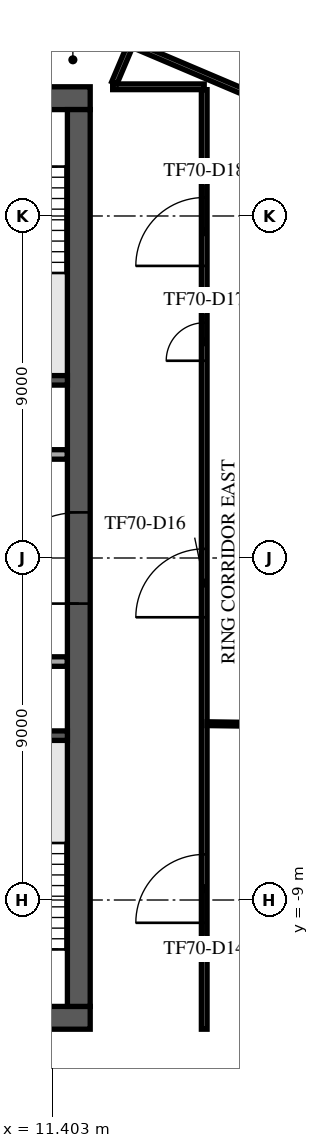
"""IFC4 building model, lengths in metres.
Left out: names, types, materials, properties, quantities, classifications, styles, units other than length and angle.
Written with IfcOpenShell. Run it as: python <this file> out.ifc"""

import sys

from ifc_helpers import new_model, si_unit, direction, frame, frame_2d, origin, place, context, subcontext, project, spatial, rectangle, extrude, element, fill, save


model = new_model("IFC4")
c1 = context("Model", 3, precision=1e-05, world=origin(), true_north=direction((0.0, 1.0)))
c2 = subcontext(c1, "Body", "Model", "MODEL_VIEW")
j1 = project(units=[si_unit("LENGTHUNIT", "METRE"), si_unit("PLANEANGLEUNIT", "RADIAN")], contexts=[c1])
p1 = place(None, origin())
s1 = spatial("IfcSite", under=j1, at=p1, CompositionType="ELEMENT")
p2 = place(p1, origin())
s2 = spatial("IfcBuilding", under=s1, at=p2, CompositionType="ELEMENT")
p3 = place(p2, frame((0.0, 0.0, 296.5)))
s3 = spatial("IfcBuildingStorey", under=s2, at=p3, CompositionType="ELEMENT", Elevation=296.5)
p4 = place(p3, frame((-12.4, 12.1, 0.0), z_axis=(0.0, 0.0, 1.0), x_axis=(1.0, 0.0, 0.0)))
e1 = element("IfcWall", 1, at=p4, inside=s3, PredefinedType="SHEAR", context=c2, shape_type="SweptSolid", body=[
    extrude(rectangle(XDim=24.8, YDim=0.6, at=frame_2d((12.4, 0.0))), origin(), (0.0, 0.0, 1.0), 3.65),
])
p5 = place(p4, frame((11.2, 0.0, 0.0)))
e2 = element("IfcOpeningElement", 2, at=p5, cuts=e1, PredefinedType="OPENING", context=c2, shape_type="SweptSolid", body=[
    extrude(rectangle(XDim=2.4, YDim=2.4, at=frame_2d((1.2, 1.2))), frame((0.0, 0.31, 0.0), z_axis=(0.0, -1.0, 0.0), x_axis=(1.0, 0.0, 0.0)), (0.0, 0.0, 1.0), 0.62),
])
p6 = place(p4, frame((22.025, 0.0, 0.0)))
e3 = element("IfcOpeningElement", 3, at=p6, cuts=e1, PredefinedType="OPENING", context=c2, shape_type="SweptSolid", body=[
    extrude(rectangle(XDim=1.2, YDim=2.1, at=frame_2d((0.6, 1.05))), frame((0.0, 0.31, 0.0), z_axis=(0.0, -1.0, 0.0), x_axis=(1.0, 0.0, 0.0)), (0.0, 0.0, 1.0), 0.62),
])
p7 = place(p4, frame((1.0, 0.0, 0.0)))
e4 = element("IfcOpeningElement", 4, at=p7, cuts=e1, PredefinedType="OPENING", context=c2, shape_type="SweptSolid", body=[
    extrude(rectangle(XDim=1.0, YDim=2.1, at=frame_2d((0.5, 1.05))), frame((0.0, 0.31, 0.0), z_axis=(0.0, -1.0, 0.0), x_axis=(1.0, 0.0, 0.0)), (0.0, 0.0, 1.0), 0.62),
])
p8 = place(p3, frame((-12.4, -12.1, 0.0), z_axis=(0.0, 0.0, 1.0), x_axis=(1.0, 0.0, 0.0)))
e5 = element("IfcWall", 5, at=p8, inside=s3, PredefinedType="SHEAR", context=c2, shape_type="SweptSolid", body=[
    extrude(rectangle(XDim=24.8, YDim=0.6, at=frame_2d((12.4, 0.0))), origin(), (0.0, 0.0, 1.0), 3.65),
])
p9 = place(p8, frame((7.3, 0.0, 0.0)))
e6 = element("IfcOpeningElement", 6, at=p9, cuts=e5, PredefinedType="OPENING", context=c2, shape_type="SweptSolid", body=[
    extrude(rectangle(XDim=2.0, YDim=2.1, at=frame_2d((1.0, 1.05))), frame((0.0, 0.31, 0.0), z_axis=(0.0, -1.0, 0.0), x_axis=(1.0, 0.0, 0.0)), (0.0, 0.0, 1.0), 0.62),
])
p10 = place(p8, frame((17.425, 0.0, 0.0)))
e7 = element("IfcOpeningElement", 7, at=p10, cuts=e5, PredefinedType="OPENING", context=c2, shape_type="SweptSolid", body=[
    extrude(rectangle(XDim=1.2, YDim=2.1, at=frame_2d((0.6, 1.05))), frame((0.0, 0.31, 0.0), z_axis=(0.0, -1.0, 0.0), x_axis=(1.0, 0.0, 0.0)), (0.0, 0.0, 1.0), 0.62),
])
p11 = place(p8, frame((1.575, 0.0, 0.0)))
e8 = element("IfcOpeningElement", 8, at=p11, cuts=e5, PredefinedType="OPENING", context=c2, shape_type="SweptSolid", body=[
    extrude(rectangle(XDim=1.2, YDim=2.1, at=frame_2d((0.6, 1.05))), frame((0.0, 0.31, 0.0), z_axis=(0.0, -1.0, 0.0), x_axis=(1.0, 0.0, 0.0)), (0.0, 0.0, 1.0), 0.62),
])
p12 = place(p8, frame((22.025, 0.0, 0.0)))
e9 = element("IfcOpeningElement", 9, at=p12, cuts=e5, PredefinedType="OPENING", context=c2, shape_type="SweptSolid", body=[
    extrude(rectangle(XDim=1.2, YDim=2.1, at=frame_2d((0.6, 1.05))), frame((0.0, 0.31, 0.0), z_axis=(0.0, -1.0, 0.0), x_axis=(1.0, 0.0, 0.0)), (0.0, 0.0, 1.0), 0.62),
])
p13 = place(p3, frame((12.1, -11.8, 0.0), z_axis=(0.0, 0.0, 1.0), x_axis=(0.0, 1.0, 0.0)))
e10 = element("IfcWall", 10, at=p13, inside=s3, PredefinedType="SHEAR", context=c2, shape_type="SweptSolid", body=[
    extrude(rectangle(XDim=23.6, YDim=0.6, at=frame_2d((11.8, 0.0))), origin(), (0.0, 0.0, 1.0), 3.65),
])
p14 = place(p13, frame((10.6, 0.0, 0.0)))
e11 = element("IfcOpeningElement", 11, at=p14, cuts=e10, PredefinedType="OPENING", context=c2, shape_type="SweptSolid", body=[
    extrude(rectangle(XDim=2.4, YDim=2.4, at=frame_2d((1.2, 1.2))), frame((0.0, 0.31, 0.0), z_axis=(0.0, -1.0, 0.0), x_axis=(1.0, 0.0, 0.0)), (0.0, 0.0, 1.0), 0.62),
])
for number, where, z_axis, x_axis in (
    (12, (8.65, 4.675, 0.0), (0.0, 0.0, 1.0), (1.0, 0.0, 0.0)),
    (13, (8.65, -4.675, 0.0), (0.0, 0.0, 1.0), (1.0, 0.0, 0.0)),
):
    element("IfcWall", number, at=place(p3, frame(where, z_axis=z_axis, x_axis=x_axis)), inside=s3, PredefinedType="SOLIDWALL", context=c2, shape_type="SweptSolid", body=[
        extrude(rectangle(XDim=3.15, YDim=0.25, at=frame_2d((1.575, 0.0))), origin(), (0.0, 0.0, 1.0), 3.65),
    ])
p15 = place(p3, frame((5.63, -2.725, 0.0), z_axis=(0.0, 0.0, 1.0), x_axis=(1.0, 0.0, 0.0)))
e14 = element("IfcWall", 14, at=p15, inside=s3, PredefinedType="PARTITIONING", context=c2, shape_type="SweptSolid", body=[
    extrude(rectangle(XDim=6.165, YDim=0.25, at=frame_2d((3.083, 0.0))), origin(), (0.0, 0.0, 1.0), 3.65),
])
p16 = place(p15, frame((0.745, 0.0, 0.0)))
e15 = element("IfcOpeningElement", 15, at=p16, cuts=e14, PredefinedType="OPENING", context=c2, shape_type="SweptSolid", body=[
    extrude(rectangle(XDim=1.0, YDim=2.1, at=frame_2d((0.5, 1.05))), frame((0.0, 0.135, 0.0), z_axis=(0.0, -1.0, 0.0), x_axis=(1.0, 0.0, 0.0)), (0.0, 0.0, 1.0), 0.27),
])
p17 = place(p15, frame((3.92, 0.0, 0.0)))
e16 = element("IfcOpeningElement", 16, at=p17, cuts=e14, PredefinedType="OPENING", context=c2, shape_type="SweptSolid", body=[
    extrude(rectangle(XDim=0.9, YDim=2.1, at=frame_2d((0.45, 1.05))), frame((0.0, 0.135, 0.0), z_axis=(0.0, -1.0, 0.0), x_axis=(1.0, 0.0, 0.0)), (0.0, 0.0, 1.0), 0.27),
])
p18 = place(p3, frame((-11.795, 2.725, 0.0), z_axis=(0.0, 0.0, 1.0), x_axis=(1.0, 0.0, 0.0)))
e17 = element("IfcWall", 17, at=p18, inside=s3, PredefinedType="PARTITIONING", context=c2, shape_type="SweptSolid", body=[
    extrude(rectangle(XDim=23.59, YDim=0.25, at=frame_2d((11.795, 0.0))), origin(), (0.0, 0.0, 1.0), 3.65),
])
p19 = place(p18, frame((21.345, 0.0, 0.0)))
e18 = element("IfcOpeningElement", 18, at=p19, cuts=e17, PredefinedType="OPENING", context=c2, shape_type="SweptSolid", body=[
    extrude(rectangle(XDim=0.9, YDim=2.1, at=frame_2d((0.45, 1.05))), frame((0.0, 0.135, 0.0), z_axis=(0.0, -1.0, 0.0), x_axis=(1.0, 0.0, 0.0)), (0.0, 0.0, 1.0), 0.27),
])
p20 = place(p18, frame((1.345, 0.0, 0.0)))
e19 = element("IfcOpeningElement", 19, at=p20, cuts=e17, PredefinedType="OPENING", context=c2, shape_type="SweptSolid", body=[
    extrude(rectangle(XDim=0.9, YDim=2.1, at=frame_2d((0.45, 1.05))), frame((0.0, 0.135, 0.0), z_axis=(0.0, -1.0, 0.0), x_axis=(1.0, 0.0, 0.0)), (0.0, 0.0, 1.0), 0.27),
])
p21 = place(p18, frame((4.42, 0.0, 0.0)))
e20 = element("IfcOpeningElement", 20, at=p21, cuts=e17, PredefinedType="OPENING", context=c2, shape_type="SweptSolid", body=[
    extrude(rectangle(XDim=1.0, YDim=2.1, at=frame_2d((0.5, 1.05))), frame((0.0, 0.135, 0.0), z_axis=(0.0, -1.0, 0.0), x_axis=(1.0, 0.0, 0.0)), (0.0, 0.0, 1.0), 0.27),
])
p22 = place(p18, frame((9.82, 0.0, 0.0)))
e21 = element("IfcOpeningElement", 21, at=p22, cuts=e17, PredefinedType="OPENING", context=c2, shape_type="SweptSolid", body=[
    extrude(rectangle(XDim=1.2, YDim=2.1, at=frame_2d((0.6, 1.05))), frame((0.0, 0.135, 0.0), z_axis=(0.0, -1.0, 0.0), x_axis=(1.0, 0.0, 0.0)), (0.0, 0.0, 1.0), 0.27),
])
p23 = place(p3, frame((15.204, -32.515, 0.0), z_axis=(0.0, 0.0, 1.0), x_axis=(0.390728997462, 0.920505758017, 0.0)))
e22 = element("IfcWall", 22, at=p23, inside=s3, PredefinedType="STANDARD", context=c2, shape_type="SweptSolid", body=[
    extrude(rectangle(XDim=47.979, YDim=0.6, at=frame_2d((23.99, 0.0))), origin(), (0.0, 0.0, 1.0), 3.65),
])
p24 = place(p23, frame((1.231, 0.0, 0.9)))
e23 = element("IfcOpeningElement", 23, at=p24, cuts=e22, PredefinedType="OPENING", context=c2, shape_type="SweptSolid", body=[
    extrude(rectangle(XDim=1.9, YDim=2.1, at=frame_2d((0.95, 1.05))), frame((0.0, 0.31, 0.0), z_axis=(0.0, -1.0, 0.0), x_axis=(1.0, 0.0, 0.0)), (0.0, 0.0, 1.0), 0.62),
])
p25 = place(p23, frame((5.593, 0.0, 0.9)))
e24 = element("IfcOpeningElement", 24, at=p25, cuts=e22, PredefinedType="OPENING", context=c2, shape_type="SweptSolid", body=[
    extrude(rectangle(XDim=1.9, YDim=2.1, at=frame_2d((0.95, 1.05))), frame((0.0, 0.31, 0.0), z_axis=(0.0, -1.0, 0.0), x_axis=(1.0, 0.0, 0.0)), (0.0, 0.0, 1.0), 0.62),
])
p26 = place(p23, frame((9.954, 0.0, 0.9)))
e25 = element("IfcOpeningElement", 25, at=p26, cuts=e22, PredefinedType="OPENING", context=c2, shape_type="SweptSolid", body=[
    extrude(rectangle(XDim=1.9, YDim=2.1, at=frame_2d((0.95, 1.05))), frame((0.0, 0.31, 0.0), z_axis=(0.0, -1.0, 0.0), x_axis=(1.0, 0.0, 0.0)), (0.0, 0.0, 1.0), 0.62),
])
p27 = place(p23, frame((14.316, 0.0, 0.9)))
e26 = element("IfcOpeningElement", 26, at=p27, cuts=e22, PredefinedType="OPENING", context=c2, shape_type="SweptSolid", body=[
    extrude(rectangle(XDim=1.9, YDim=2.1, at=frame_2d((0.95, 1.05))), frame((0.0, 0.31, 0.0), z_axis=(0.0, -1.0, 0.0), x_axis=(1.0, 0.0, 0.0)), (0.0, 0.0, 1.0), 0.62),
])
p28 = place(p23, frame((18.678, 0.0, 0.9)))
e27 = element("IfcOpeningElement", 27, at=p28, cuts=e22, PredefinedType="OPENING", context=c2, shape_type="SweptSolid", body=[
    extrude(rectangle(XDim=1.9, YDim=2.1, at=frame_2d((0.95, 1.05))), frame((0.0, 0.31, 0.0), z_axis=(0.0, -1.0, 0.0), x_axis=(1.0, 0.0, 0.0)), (0.0, 0.0, 1.0), 0.62),
])
p29 = place(p23, frame((23.04, 0.0, 0.9)))
e28 = element("IfcOpeningElement", 28, at=p29, cuts=e22, PredefinedType="OPENING", context=c2, shape_type="SweptSolid", body=[
    extrude(rectangle(XDim=1.9, YDim=2.1, at=frame_2d((0.95, 1.05))), frame((0.0, 0.31, 0.0), z_axis=(0.0, -1.0, 0.0), x_axis=(1.0, 0.0, 0.0)), (0.0, 0.0, 1.0), 0.62),
])
p30 = place(p23, frame((27.401, 0.0, 0.9)))
e29 = element("IfcOpeningElement", 29, at=p30, cuts=e22, PredefinedType="OPENING", context=c2, shape_type="SweptSolid", body=[
    extrude(rectangle(XDim=1.9, YDim=2.1, at=frame_2d((0.95, 1.05))), frame((0.0, 0.31, 0.0), z_axis=(0.0, -1.0, 0.0), x_axis=(1.0, 0.0, 0.0)), (0.0, 0.0, 1.0), 0.62),
])
p31 = place(p23, frame((31.763, 0.0, 0.9)))
e30 = element("IfcOpeningElement", 30, at=p31, cuts=e22, PredefinedType="OPENING", context=c2, shape_type="SweptSolid", body=[
    extrude(rectangle(XDim=1.9, YDim=2.1, at=frame_2d((0.95, 1.05))), frame((0.0, 0.31, 0.0), z_axis=(0.0, -1.0, 0.0), x_axis=(1.0, 0.0, 0.0)), (0.0, 0.0, 1.0), 0.62),
])
p32 = place(p23, frame((36.125, 0.0, 0.9)))
e31 = element("IfcOpeningElement", 31, at=p32, cuts=e22, PredefinedType="OPENING", context=c2, shape_type="SweptSolid", body=[
    extrude(rectangle(XDim=1.9, YDim=2.1, at=frame_2d((0.95, 1.05))), frame((0.0, 0.31, 0.0), z_axis=(0.0, -1.0, 0.0), x_axis=(1.0, 0.0, 0.0)), (0.0, 0.0, 1.0), 0.62),
])
p33 = place(p23, frame((40.487, 0.0, 0.9)))
e32 = element("IfcOpeningElement", 32, at=p33, cuts=e22, PredefinedType="OPENING", context=c2, shape_type="SweptSolid", body=[
    extrude(rectangle(XDim=1.9, YDim=2.1, at=frame_2d((0.95, 1.05))), frame((0.0, 0.31, 0.0), z_axis=(0.0, -1.0, 0.0), x_axis=(1.0, 0.0, 0.0)), (0.0, 0.0, 1.0), 0.62),
])
p34 = place(p23, frame((44.848, 0.0, 0.9)))
e33 = element("IfcOpeningElement", 33, at=p34, cuts=e22, PredefinedType="OPENING", context=c2, shape_type="SweptSolid", body=[
    extrude(rectangle(XDim=1.9, YDim=2.1, at=frame_2d((0.95, 1.05))), frame((0.0, 0.31, 0.0), z_axis=(0.0, -1.0, 0.0), x_axis=(1.0, 0.0, 0.0)), (0.0, 0.0, 1.0), 0.62),
])
p35 = place(p3, frame((-8.176, 25.325, 0.0), z_axis=(0.0, 0.0, 1.0), x_axis=(0.920507643781, -0.390724554821, 0.0)))
e34 = element("IfcWall", 34, at=p35, inside=s3, PredefinedType="PARTITIONING", context=c2, shape_type="SweptSolid", body=[
    extrude(rectangle(XDim=34.917, YDim=0.15, at=frame_2d((17.458, 0.0))), origin(), (0.0, 0.0, 1.0), 3.25),
])
p36 = place(p35, frame((5.55, 0.0, 0.0)))
e35 = element("IfcOpeningElement", 35, at=p36, cuts=e34, PredefinedType="OPENING", context=c2, shape_type="SweptSolid", body=[
    extrude(rectangle(XDim=1.8, YDim=2.1, at=frame_2d((0.9, 1.05))), frame((0.0, 0.085, 0.0), z_axis=(0.0, -1.0, 0.0), x_axis=(1.0, 0.0, 0.0)), (0.0, 0.0, 1.0), 0.17),
])
p37 = place(p35, frame((1.05, 0.0, 0.0)))
e36 = element("IfcOpeningElement", 36, at=p37, cuts=e34, PredefinedType="OPENING", context=c2, shape_type="SweptSolid", body=[
    extrude(rectangle(XDim=1.0, YDim=2.1, at=frame_2d((0.5, 1.05))), frame((0.0, 0.085, 0.0), z_axis=(0.0, -1.0, 0.0), x_axis=(1.0, 0.0, 0.0)), (0.0, 0.0, 1.0), 0.17),
])
p38 = place(p35, frame((16.098, 0.0, 0.0)))
e37 = element("IfcOpeningElement", 37, at=p38, cuts=e34, PredefinedType="OPENING", context=c2, shape_type="SweptSolid", body=[
    extrude(rectangle(XDim=1.0, YDim=2.1, at=frame_2d((0.5, 1.05))), frame((0.0, 0.085, 0.0), z_axis=(0.0, -1.0, 0.0), x_axis=(1.0, 0.0, 0.0)), (0.0, 0.0, 1.0), 0.17),
])
p39 = place(p35, frame((23.547, 0.0, 0.0)))
e38 = element("IfcOpeningElement", 38, at=p39, cuts=e34, PredefinedType="OPENING", context=c2, shape_type="SweptSolid", body=[
    extrude(rectangle(XDim=1.0, YDim=2.1, at=frame_2d((0.5, 1.05))), frame((0.0, 0.085, 0.0), z_axis=(0.0, -1.0, 0.0), x_axis=(1.0, 0.0, 0.0)), (0.0, 0.0, 1.0), 0.17),
])
p40 = place(p3, frame((12.991, 12.4, 0.0), z_axis=(0.0, 0.0, 1.0), x_axis=(1.0, 0.0, 0.0)))
e39 = element("IfcWall", 39, at=p40, inside=s3, PredefinedType="PARTITIONING", context=c2, shape_type="SweptSolid", body=[
    extrude(rectangle(XDim=2.409, YDim=0.15, at=frame_2d((1.205, 0.0))), origin(), (0.0, 0.0, 1.0), 3.13),
])
p41 = place(p3, frame((13.035, 12.504, 0.0), z_axis=(0.0, 0.0, 1.0), x_axis=(0.390634335845, 0.920545933487, 0.0)))
e40 = element("IfcWall", 40, at=p41, inside=s3, PredefinedType="PARTITIONING", context=c2, shape_type="SweptSolid", body=[
    extrude(rectangle(XDim=1.113, YDim=0.15, at=frame_2d((0.557, 0.0))), origin(), (0.0, 0.0, 1.0), 3.13),
])
p42 = place(p3, frame((13.539, 13.5, 0.0), z_axis=(0.0, 0.0, 1.0), x_axis=(0.920505387388, -0.390729870613, 0.0)))
e41 = element("IfcWall", 41, at=p42, inside=s3, PredefinedType="PARTITIONING", context=c2, shape_type="SweptSolid", body=[
    extrude(rectangle(XDim=10.309, YDim=0.15, at=frame_2d((5.154, 0.0))), origin(), (0.0, 0.0, 1.0), 3.25),
])
p43 = place(p3, frame((15.4, -12.4, 0.0), z_axis=(0.0, 0.0, 1.0), x_axis=(0.0, 1.0, 0.0)))
e42 = element("IfcWall", 42, at=p43, inside=s3, PredefinedType="PARTITIONING", context=c2, shape_type="SweptSolid", body=[
    extrude(rectangle(XDim=24.725, YDim=0.15, at=frame_2d((12.362, 0.0))), origin(), (0.0, 0.0, 1.0), 3.25),
])
p44 = place(p43, frame((2.8, 0.0, 0.0)))
e43 = element("IfcOpeningElement", 43, at=p44, cuts=e42, PredefinedType="OPENING", context=c2, shape_type="SweptSolid", body=[
    extrude(rectangle(XDim=1.8, YDim=2.1, at=frame_2d((0.9, 1.05))), frame((0.0, 0.085, 0.0), z_axis=(0.0, -1.0, 0.0), x_axis=(1.0, 0.0, 0.0)), (0.0, 0.0, 1.0), 0.17),
])
p45 = place(p43, frame((10.84, 0.0, 0.0)))
e44 = element("IfcOpeningElement", 44, at=p45, cuts=e42, PredefinedType="OPENING", context=c2, shape_type="SweptSolid", body=[
    extrude(rectangle(XDim=1.8, YDim=2.1, at=frame_2d((0.9, 1.05))), frame((0.0, 0.085, 0.0), z_axis=(0.0, -1.0, 0.0), x_axis=(1.0, 0.0, 0.0)), (0.0, 0.0, 1.0), 0.17),
])
p46 = place(p43, frame((17.59, 0.0, 0.0)))
e45 = element("IfcOpeningElement", 45, at=p46, cuts=e42, PredefinedType="OPENING", context=c2, shape_type="SweptSolid", body=[
    extrude(rectangle(XDim=1.0, YDim=2.1, at=frame_2d((0.5, 1.05))), frame((0.0, 0.085, 0.0), z_axis=(0.0, -1.0, 0.0), x_axis=(1.0, 0.0, 0.0)), (0.0, 0.0, 1.0), 0.17),
])
p47 = place(p43, frame((20.086, 0.0, 0.0)))
e46 = element("IfcOpeningElement", 46, at=p47, cuts=e42, PredefinedType="OPENING", context=c2, shape_type="SweptSolid", body=[
    extrude(rectangle(XDim=1.8, YDim=2.1, at=frame_2d((0.9, 1.05))), frame((0.0, 0.085, 0.0), z_axis=(0.0, -1.0, 0.0), x_axis=(1.0, 0.0, 0.0)), (0.0, 0.0, 1.0), 0.17),
])
p48 = place(p3, frame((15.476, -4.36, 0.0), z_axis=(0.0, 0.0, 1.0), x_axis=(0.999902345391, -0.013974966252, 0.0)))
e47 = element("IfcWall", 47, at=p48, inside=s3, PredefinedType="PARTITIONING", context=c2, shape_type="SweptSolid", body=[
    extrude(rectangle(XDim=11.286, YDim=0.1, at=frame_2d((5.643, 0.0))), origin(), (0.0, 0.0, 1.0), 3.65),
])
p49 = place(p3, frame((15.477, 6.889, 0.0), z_axis=(0.0, 0.0, 1.0), x_axis=(0.999319883967, 0.036875052648, 0.0)))
e48 = element("IfcWall", 48, at=p49, inside=s3, PredefinedType="PARTITIONING", context=c2, shape_type="SweptSolid", body=[
    extrude(rectangle(XDim=16.393, YDim=0.1, at=frame_2d((8.197, 0.0))), origin(), (0.0, 0.0, 1.0), 3.65),
])
p50 = place(p14, origin())
e49 = element("IfcDoor", 49, at=p50, inside=s3, OperationType="SINGLE_SWING_LEFT", PredefinedType="DOOR", context=c2, shape_type="SweptSolid", body=[
    extrude(rectangle(XDim=2.4, YDim=2.4, at=frame_2d((1.2, 1.2))), frame((0.0, 0.025, 0.0), z_axis=(0.0, -1.0, 0.0), x_axis=(1.0, 0.0, 0.0)), (0.0, 0.0, 1.0), 0.05),
])
fill(e11, e49)
p51 = place(p44, frame((1.8, 0.0, 0.0), z_axis=(0.0, 0.0, 1.0), x_axis=(-1.0, 0.0, 0.0)))
e50 = element("IfcDoor", 50, at=p51, inside=s3, OperationType="DOUBLE_DOOR_SINGLE_SWING", PredefinedType="DOOR", context=c2, shape_type="SweptSolid", body=[
    extrude(rectangle(XDim=1.8, YDim=2.1, at=frame_2d((0.9, 1.05))), frame((0.0, 0.025, 0.0), z_axis=(0.0, -1.0, 0.0), x_axis=(1.0, 0.0, 0.0)), (0.0, 0.0, 1.0), 0.05),
])
fill(e43, e50)
p52 = place(p45, frame((1.8, 0.0, 0.0), z_axis=(0.0, 0.0, 1.0), x_axis=(-1.0, 0.0, 0.0)))
e51 = element("IfcDoor", 51, at=p52, inside=s3, OperationType="DOUBLE_DOOR_SINGLE_SWING", PredefinedType="DOOR", context=c2, shape_type="SweptSolid", body=[
    extrude(rectangle(XDim=1.8, YDim=2.1, at=frame_2d((0.9, 1.05))), frame((0.0, 0.025, 0.0), z_axis=(0.0, -1.0, 0.0), x_axis=(1.0, 0.0, 0.0)), (0.0, 0.0, 1.0), 0.05),
])
fill(e44, e51)
p53 = place(p46, frame((1.0, 0.0, 0.0), z_axis=(0.0, 0.0, 1.0), x_axis=(-1.0, 0.0, 0.0)))
e52 = element("IfcDoor", 52, at=p53, inside=s3, OperationType="SINGLE_SWING_LEFT", PredefinedType="DOOR", context=c2, shape_type="SweptSolid", body=[
    extrude(rectangle(XDim=1.0, YDim=2.1, at=frame_2d((0.5, 1.05))), frame((0.0, 0.025, 0.0), z_axis=(0.0, -1.0, 0.0), x_axis=(1.0, 0.0, 0.0)), (0.0, 0.0, 1.0), 0.05),
])
fill(e45, e52)
p54 = place(p47, frame((1.8, 0.0, 0.0), z_axis=(0.0, 0.0, 1.0), x_axis=(-1.0, 0.0, 0.0)))
e53 = element("IfcDoor", 53, at=p54, inside=s3, OperationType="DOUBLE_DOOR_SINGLE_SWING", PredefinedType="DOOR", context=c2, shape_type="SweptSolid", body=[
    extrude(rectangle(XDim=1.8, YDim=2.1, at=frame_2d((0.9, 1.05))), frame((0.0, 0.025, 0.0), z_axis=(0.0, -1.0, 0.0), x_axis=(1.0, 0.0, 0.0)), (0.0, 0.0, 1.0), 0.05),
])
fill(e46, e53)
save(model, sys.argv[1])
